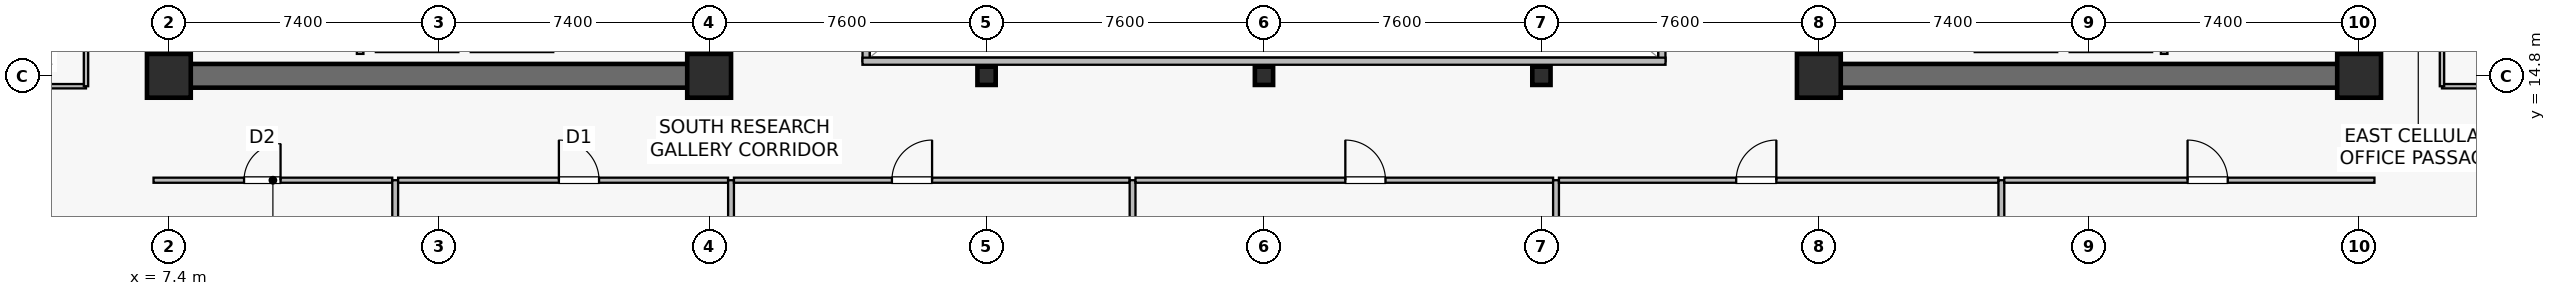
"""IFC4 building model, lengths in metres.
Left out: names, types, materials, properties, quantities, classifications, styles, units other than length and angle.
Written with IfcOpenShell. Run it as: python <this file> out.ifc"""

import sys

from ifc_helpers import new_model, si_unit, direction, frame, frame_2d, origin, origin_2d, place, context, subcontext, project, spatial, rectangle, hollow_rectangle, extrude, source, transform, mapped, element, fill, save


model = new_model("IFC4")
c1 = context("Model", 3, precision=1e-05, world=origin(), true_north=direction((0.0, 1.0)))
c2 = subcontext(c1, "Body", "Model", "MODEL_VIEW")
j1 = project(units=[si_unit("LENGTHUNIT", "METRE"), si_unit("PLANEANGLEUNIT", "RADIAN")], contexts=[c1])
p1 = place(None, origin())
s1 = spatial("IfcSite", under=j1, at=p1, CompositionType="ELEMENT")
p2 = place(p1, origin())
s2 = spatial("IfcBuilding", under=s1, at=p2, CompositionType="ELEMENT")
p3 = place(p2, frame((0.0, 0.0, 162.5)))
s3 = spatial("IfcBuildingStorey", under=s2, at=p3, CompositionType="ELEMENT", Elevation=162.5)
p4 = place(p3, frame((7.075, 14.8, 0.0), z_axis=(0.0, 0.0, 1.0), x_axis=(1.0, 0.0, 0.0)))
e1 = element("IfcWall", 1, at=p4, inside=s3, PredefinedType="SHEAR", context=c2, shape_type="SweptSolid", body=[
    extrude(rectangle(XDim=15.45, YDim=0.65, at=frame_2d((7.725, 0.0))), origin(), (0.0, 0.0, 1.0), 3.79),
])
p5 = place(p3, frame((7.4, 15.125, 0.0), z_axis=(0.0, 0.0, 1.0), x_axis=(0.0, 1.0, 0.0)))
e2 = element("IfcWall", 2, at=p5, inside=s3, PredefinedType="SHEAR", context=c2, shape_type="SweptSolid", body=[
    extrude(rectangle(XDim=18.35, YDim=0.65, at=frame_2d((9.175, 0.0))), origin(), (0.0, 0.0, 1.0), 3.79),
])
p6 = place(p3, frame((22.2, 15.125, 0.0), z_axis=(0.0, 0.0, 1.0), x_axis=(0.0, 1.0, 0.0)))
e3 = element("IfcWall", 3, at=p6, inside=s3, PredefinedType="SHEAR", context=c2, shape_type="SweptSolid", body=[
    extrude(rectangle(XDim=18.35, YDim=0.65, at=frame_2d((9.175, 0.0))), origin(), (0.0, 0.0, 1.0), 3.79),
])
p7 = place(p6, frame((3.425, 0.0, 0.0)))
e4 = element("IfcOpeningElement", 4, at=p7, cuts=e3, PredefinedType="OPENING", context=c2, shape_type="SweptSolid", body=[
    extrude(rectangle(XDim=1.42, YDim=2.2, at=frame_2d((0.71, 1.1))), frame((0.0, 0.335, 0.0), z_axis=(0.0, -1.0, 0.0), x_axis=(1.0, 0.0, 0.0)), (0.0, 0.0, 1.0), 0.67),
])
p8 = place(p3, frame((52.275, 14.8, 0.0), z_axis=(0.0, 0.0, 1.0), x_axis=(1.0, 0.0, 0.0)))
e5 = element("IfcWall", 5, at=p8, inside=s3, PredefinedType="SHEAR", context=c2, shape_type="SweptSolid", body=[
    extrude(rectangle(XDim=15.45, YDim=0.65, at=frame_2d((7.725, 0.0))), origin(), (0.0, 0.0, 1.0), 3.79),
])
p9 = place(p3, frame((52.6, 15.125, 0.0), z_axis=(0.0, 0.0, 1.0), x_axis=(0.0, 1.0, 0.0)))
e6 = element("IfcWall", 6, at=p9, inside=s3, PredefinedType="SHEAR", context=c2, shape_type="SweptSolid", body=[
    extrude(rectangle(XDim=18.35, YDim=0.65, at=frame_2d((9.175, 0.0))), origin(), (0.0, 0.0, 1.0), 3.79),
])
p10 = place(p9, frame((3.425, 0.0, 0.0)))
e7 = element("IfcOpeningElement", 7, at=p10, cuts=e6, PredefinedType="OPENING", context=c2, shape_type="SweptSolid", body=[
    extrude(rectangle(XDim=1.42, YDim=2.2, at=frame_2d((0.71, 1.1))), frame((0.0, 0.335, 0.0), z_axis=(0.0, -1.0, 0.0), x_axis=(1.0, 0.0, 0.0)), (0.0, 0.0, 1.0), 0.67),
])
p11 = place(p3, frame((67.4, 15.125, 0.0), z_axis=(0.0, 0.0, 1.0), x_axis=(0.0, 1.0, 0.0)))
e8 = element("IfcWall", 8, at=p11, inside=s3, PredefinedType="SHEAR", context=c2, shape_type="SweptSolid", body=[
    extrude(rectangle(XDim=18.35, YDim=0.65, at=frame_2d((9.175, 0.0))), origin(), (0.0, 0.0, 1.0), 3.79),
])
m1 = source(origin(), c2, "Body", "SweptSolid", [
    extrude(rectangle(XDim=1.2, YDim=1.2, at=origin_2d()), origin(), (0.0, 0.0, 1.0), 4.1),
])
for number, where, z_axis, x_axis in (
    (9, (7.4, 14.8, 0.0), (0.0, 0.0, 1.0), (1.0, 0.0, 0.0)),
    (10, (22.2, 14.8, 0.0), (0.0, 0.0, 1.0), (1.0, 0.0, 0.0)),
    (11, (52.6, 14.8, 0.0), (0.0, 0.0, 1.0), (1.0, 0.0, 0.0)),
    (12, (67.4, 14.8, 0.0), (0.0, 0.0, 1.0), (1.0, 0.0, 0.0)),
):
    element("IfcColumn", number, at=place(p3, frame(where, z_axis=z_axis, x_axis=x_axis)), inside=s3, PredefinedType="COLUMN", context=c2, shape_type="MappedRepresentation", body=[
        mapped(m1, transform((0.0, 0.0, 0.0), scale=1.0)),
    ])
m2 = source(origin(), c2, "Body", "SweptSolid", [
    extrude(hollow_rectangle(XDim=0.5, YDim=0.5, WallThickness=0.022, at=origin_2d()), origin(), (0.0, 0.0, 1.0), 4.1),
])
for number, where, z_axis, x_axis in (
    (13, (29.8, 14.8, 0.0), (0.0, 0.0, 1.0), (1.0, 0.0, 0.0)),
    (14, (37.4, 14.8, 0.0), (0.0, 0.0, 1.0), (1.0, 0.0, 0.0)),
    (15, (45.0, 14.8, 0.0), (0.0, 0.0, 1.0), (1.0, 0.0, 0.0)),
):
    element("IfcColumn", number, at=place(p3, frame(where, z_axis=z_axis, x_axis=x_axis)), inside=s3, PredefinedType="COLUMN", context=c2, shape_type="MappedRepresentation", body=[
        mapped(m2, transform((0.0, 0.0, 0.0), scale=1.0)),
    ])
p12 = place(p3, frame((13.07, 15.55, 0.0), z_axis=(0.0, 0.0, 1.0), x_axis=(1.0, 0.0, 0.0)))
e16 = element("IfcWall", 16, at=p12, inside=s3, PredefinedType="SOLIDWALL", context=c2, shape_type="SweptSolid", body=[
    extrude(rectangle(XDim=2.26, YDim=0.2, at=frame_2d((1.13, 0.0))), origin(), (0.0, 0.0, 1.0), 3.187),
])
p13 = place(p3, frame((15.67, 15.55, 0.0), z_axis=(0.0, 0.0, 1.0), x_axis=(1.0, 0.0, 0.0)))
e17 = element("IfcWall", 17, at=p13, inside=s3, PredefinedType="SOLIDWALL", context=c2, shape_type="SweptSolid", body=[
    extrude(rectangle(XDim=2.26, YDim=0.2, at=frame_2d((1.13, 0.0))), origin(), (0.0, 0.0, 1.0), 3.79),
])
p14 = place(p3, frame((12.64, 15.4, 0.0), z_axis=(0.0, 0.0, 1.0), x_axis=(0.0, 1.0, 0.0)))
e18 = element("IfcWall", 18, at=p14, inside=s3, PredefinedType="SOLIDWALL", context=c2, shape_type="SweptSolid", body=[
    extrude(rectangle(XDim=2.4, YDim=0.18, at=frame_2d((1.2, 0.0))), origin(), (0.0, 0.0, 1.0), 3.79),
])
p15 = place(p3, frame((59.47, 15.55, 0.0), z_axis=(0.0, 0.0, 1.0), x_axis=(1.0, 0.0, 0.0)))
e19 = element("IfcWall", 19, at=p15, inside=s3, PredefinedType="SOLIDWALL", context=c2, shape_type="SweptSolid", body=[
    extrude(rectangle(XDim=2.26, YDim=0.2, at=frame_2d((1.13, 0.0))), origin(), (0.0, 0.0, 1.0), 3.187),
])
p16 = place(p3, frame((56.87, 15.55, 0.0), z_axis=(0.0, 0.0, 1.0), x_axis=(1.0, 0.0, 0.0)))
e20 = element("IfcWall", 20, at=p16, inside=s3, PredefinedType="SOLIDWALL", context=c2, shape_type="SweptSolid", body=[
    extrude(rectangle(XDim=2.26, YDim=0.2, at=frame_2d((1.13, 0.0))), origin(), (0.0, 0.0, 1.0), 3.79),
])
p17 = place(p3, frame((62.06, 15.4, 0.0), z_axis=(0.0, 0.0, 1.0), x_axis=(0.0, 1.0, 0.0)))
e21 = element("IfcWall", 21, at=p17, inside=s3, PredefinedType="SOLIDWALL", context=c2, shape_type="SweptSolid", body=[
    extrude(rectangle(XDim=2.4, YDim=0.18, at=frame_2d((1.2, 0.0))), origin(), (0.0, 0.0, 1.0), 3.79),
])
p18 = place(p3, frame((26.5, 15.2, 0.0), z_axis=(0.0, 0.0, 1.0), x_axis=(0.0, 1.0, 0.0)))
e22 = element("IfcWall", 22, at=p18, inside=s3, PredefinedType="SOLIDWALL", context=c2, shape_type="SweptSolid", body=[
    extrude(rectangle(XDim=18.2, YDim=0.195, at=frame_2d((9.1, 0.0))), origin(), (0.0, 0.0, 1.0), 3.79),
])
p19 = place(p18, frame((1.8, 0.0, 0.9)))
e23 = element("IfcOpeningElement", 23, at=p19, cuts=e22, PredefinedType="OPENING", context=c2, shape_type="SweptSolid", body=[
    extrude(rectangle(XDim=1.2, YDim=1.35, at=frame_2d((0.6, 0.675))), frame((0.0, 0.107, 0.0), z_axis=(0.0, -1.0, 0.0), x_axis=(1.0, 0.0, 0.0)), (0.0, 0.0, 1.0), 0.215),
])
p20 = place(p18, frame((13.2, 0.0, 0.9)))
e24 = element("IfcOpeningElement", 24, at=p20, cuts=e22, PredefinedType="OPENING", context=c2, shape_type="SweptSolid", body=[
    extrude(rectangle(XDim=1.2, YDim=1.35, at=frame_2d((0.6, 0.675))), frame((0.0, 0.107, 0.0), z_axis=(0.0, -1.0, 0.0), x_axis=(1.0, 0.0, 0.0)), (0.0, 0.0, 1.0), 0.215),
])
p21 = place(p3, frame((48.3, 15.2, 0.0), z_axis=(0.0, 0.0, 1.0), x_axis=(0.0, 1.0, 0.0)))
e25 = element("IfcWall", 25, at=p21, inside=s3, PredefinedType="SOLIDWALL", context=c2, shape_type="SweptSolid", body=[
    extrude(rectangle(XDim=18.2, YDim=0.195, at=frame_2d((9.1, 0.0))), origin(), (0.0, 0.0, 1.0), 3.79),
])
p22 = place(p21, frame((1.8, 0.0, 0.9)))
e26 = element("IfcOpeningElement", 26, at=p22, cuts=e25, PredefinedType="OPENING", context=c2, shape_type="SweptSolid", body=[
    extrude(rectangle(XDim=1.2, YDim=1.35, at=frame_2d((0.6, 0.675))), frame((0.0, 0.107, 0.0), z_axis=(0.0, -1.0, 0.0), x_axis=(1.0, 0.0, 0.0)), (0.0, 0.0, 1.0), 0.215),
])
p23 = place(p21, frame((13.2, 0.0, 0.9)))
e27 = element("IfcOpeningElement", 27, at=p23, cuts=e25, PredefinedType="OPENING", context=c2, shape_type="SweptSolid", body=[
    extrude(rectangle(XDim=1.2, YDim=1.35, at=frame_2d((0.6, 0.675))), frame((0.0, 0.107, 0.0), z_axis=(0.0, -1.0, 0.0), x_axis=(1.0, 0.0, 0.0)), (0.0, 0.0, 1.0), 0.215),
])
p24 = place(p3, frame((26.4, 15.2, 0.0), z_axis=(0.0, 0.0, 1.0), x_axis=(1.0, 0.0, 0.0)))
e28 = element("IfcWall", 28, at=p24, inside=s3, PredefinedType="SOLIDWALL", context=c2, shape_type="SweptSolid", body=[
    extrude(rectangle(XDim=22.0, YDim=0.195, at=frame_2d((11.0, 0.0))), origin(), (0.0, 0.0, 1.0), 3.79),
])
p25 = place(p3, frame((6.98, 11.94, 0.0), z_axis=(0.0, 0.0, 1.0), x_axis=(1.0, 0.0, 0.0)))
e29 = element("IfcWall", 29, at=p25, inside=s3, PredefinedType="PARTITIONING", context=c2, shape_type="SweptSolid", body=[
    extrude(rectangle(XDim=6.54, YDim=0.14, at=frame_2d((3.27, 0.0))), origin(), (0.0, 0.0, 1.0), 3.275),
])
p26 = place(p25, frame((2.479, 0.0, 0.0)))
e30 = element("IfcOpeningElement", 30, at=p26, cuts=e29, PredefinedType="OPENING", context=c2, shape_type="SweptSolid", body=[
    extrude(rectangle(XDim=1.0, YDim=2.15, at=frame_2d((0.5, 1.075))), frame((0.0, 0.08, 0.0), z_axis=(0.0, -1.0, 0.0), x_axis=(1.0, 0.0, 0.0)), (0.0, 0.0, 1.0), 0.16),
])
p27 = place(p3, frame((13.6, 1.41, 0.0), z_axis=(0.0, 0.0, 1.0), x_axis=(0.0, 1.0, 0.0)))
e31 = element("IfcWall", 31, at=p27, inside=s3, PredefinedType="PARTITIONING", context=c2, shape_type="SweptSolid", body=[
    extrude(rectangle(XDim=10.53, YDim=0.16, at=frame_2d((5.265, 0.0))), origin(), (0.0, 0.0, 1.0), 3.075),
])
p28 = place(p3, frame((13.68, 11.94, 0.0), z_axis=(0.0, 0.0, 1.0), x_axis=(1.0, 0.0, 0.0)))
e32 = element("IfcWall", 32, at=p28, inside=s3, PredefinedType="PARTITIONING", context=c2, shape_type="SweptSolid", body=[
    extrude(rectangle(XDim=9.04, YDim=0.14, at=frame_2d((4.52, 0.0))), origin(), (0.0, 0.0, 1.0), 3.187),
])
p29 = place(p28, frame((4.404, 0.0, 0.0)))
e33 = element("IfcOpeningElement", 33, at=p29, cuts=e32, PredefinedType="OPENING", context=c2, shape_type="SweptSolid", body=[
    extrude(rectangle(XDim=1.1, YDim=2.18, at=frame_2d((0.55, 1.09))), frame((0.0, 0.08, 0.0), z_axis=(0.0, -1.0, 0.0), x_axis=(1.0, 0.0, 0.0)), (0.0, 0.0, 1.0), 0.16),
])
p30 = place(p3, frame((22.8, 1.41, 0.0), z_axis=(0.0, 0.0, 1.0), x_axis=(0.0, 1.0, 0.0)))
e34 = element("IfcWall", 34, at=p30, inside=s3, PredefinedType="PARTITIONING", context=c2, shape_type="SweptSolid", body=[
    extrude(rectangle(XDim=10.53, YDim=0.16, at=frame_2d((5.265, 0.0))), origin(), (0.0, 0.0, 1.0), 3.075),
])
p31 = place(p3, frame((22.88, 11.94, 0.0), z_axis=(0.0, 0.0, 1.0), x_axis=(1.0, 0.0, 0.0)))
e35 = element("IfcWall", 35, at=p31, inside=s3, PredefinedType="PARTITIONING", context=c2, shape_type="SweptSolid", body=[
    extrude(rectangle(XDim=10.84, YDim=0.14, at=frame_2d((5.42, 0.0))), origin(), (0.0, 0.0, 1.0), 3.187),
])
p32 = place(p31, frame((4.328, 0.0, 0.0)))
e36 = element("IfcOpeningElement", 36, at=p32, cuts=e35, PredefinedType="OPENING", context=c2, shape_type="SweptSolid", body=[
    extrude(rectangle(XDim=1.1, YDim=2.18, at=frame_2d((0.55, 1.09))), frame((0.0, 0.08, 0.0), z_axis=(0.0, -1.0, 0.0), x_axis=(1.0, 0.0, 0.0)), (0.0, 0.0, 1.0), 0.16),
])
p33 = place(p3, frame((33.8, 2.61, 0.0), z_axis=(0.0, 0.0, 1.0), x_axis=(0.0, 1.0, 0.0)))
e37 = element("IfcWall", 37, at=p33, inside=s3, PredefinedType="PARTITIONING", context=c2, shape_type="SweptSolid", body=[
    extrude(rectangle(XDim=9.33, YDim=0.16, at=frame_2d((4.665, 0.0))), origin(), (0.0, 0.0, 1.0), 3.075),
])
p34 = place(p3, frame((33.88, 11.94, 0.0), z_axis=(0.0, 0.0, 1.0), x_axis=(1.0, 0.0, 0.0)))
e38 = element("IfcWall", 38, at=p34, inside=s3, PredefinedType="PARTITIONING", context=c2, shape_type="SweptSolid", body=[
    extrude(rectangle(XDim=11.44, YDim=0.14, at=frame_2d((5.72, 0.0))), origin(), (0.0, 0.0, 1.0), 3.187),
])
p35 = place(p34, frame((5.748, 0.0, 0.0)))
e39 = element("IfcOpeningElement", 39, at=p35, cuts=e38, PredefinedType="OPENING", context=c2, shape_type="SweptSolid", body=[
    extrude(rectangle(XDim=1.1, YDim=2.18, at=frame_2d((0.55, 1.09))), frame((0.0, 0.08, 0.0), z_axis=(0.0, -1.0, 0.0), x_axis=(1.0, 0.0, 0.0)), (0.0, 0.0, 1.0), 0.16),
])
p36 = place(p3, frame((45.4, 2.61, 0.0), z_axis=(0.0, 0.0, 1.0), x_axis=(0.0, 1.0, 0.0)))
e40 = element("IfcWall", 40, at=p36, inside=s3, PredefinedType="PARTITIONING", context=c2, shape_type="SweptSolid", body=[
    extrude(rectangle(XDim=9.33, YDim=0.16, at=frame_2d((4.665, 0.0))), origin(), (0.0, 0.0, 1.0), 3.075),
])
p37 = place(p3, frame((45.48, 11.94, 0.0), z_axis=(0.0, 0.0, 1.0), x_axis=(1.0, 0.0, 0.0)))
e41 = element("IfcWall", 41, at=p37, inside=s3, PredefinedType="PARTITIONING", context=c2, shape_type="SweptSolid", body=[
    extrude(rectangle(XDim=12.04, YDim=0.14, at=frame_2d((6.02, 0.0))), origin(), (0.0, 0.0, 1.0), 3.187),
])
p38 = place(p37, frame((4.856, 0.0, 0.0)))
e42 = element("IfcOpeningElement", 42, at=p38, cuts=e41, PredefinedType="OPENING", context=c2, shape_type="SweptSolid", body=[
    extrude(rectangle(XDim=1.1, YDim=2.18, at=frame_2d((0.55, 1.09))), frame((0.0, 0.08, 0.0), z_axis=(0.0, -1.0, 0.0), x_axis=(1.0, 0.0, 0.0)), (0.0, 0.0, 1.0), 0.16),
])
p39 = place(p3, frame((57.6, 1.41, 0.0), z_axis=(0.0, 0.0, 1.0), x_axis=(0.0, 1.0, 0.0)))
e43 = element("IfcWall", 43, at=p39, inside=s3, PredefinedType="PARTITIONING", context=c2, shape_type="SweptSolid", body=[
    extrude(rectangle(XDim=10.53, YDim=0.16, at=frame_2d((5.265, 0.0))), origin(), (0.0, 0.0, 1.0), 3.075),
])
p40 = place(p3, frame((57.68, 11.94, 0.0), z_axis=(0.0, 0.0, 1.0), x_axis=(1.0, 0.0, 0.0)))
e44 = element("IfcWall", 44, at=p40, inside=s3, PredefinedType="PARTITIONING", context=c2, shape_type="SweptSolid", body=[
    extrude(rectangle(XDim=10.14, YDim=0.14, at=frame_2d((5.07, 0.0))), origin(), (0.0, 0.0, 1.0), 3.187),
])
p41 = place(p40, frame((5.021, 0.0, 0.0)))
e45 = element("IfcOpeningElement", 45, at=p41, cuts=e44, PredefinedType="OPENING", context=c2, shape_type="SweptSolid", body=[
    extrude(rectangle(XDim=1.1, YDim=2.18, at=frame_2d((0.55, 1.09))), frame((0.0, 0.08, 0.0), z_axis=(0.0, -1.0, 0.0), x_axis=(1.0, 0.0, 0.0)), (0.0, 0.0, 1.0), 0.16),
])
p42 = place(p3, frame((2.11, 14.515, 0.0), z_axis=(0.0, 0.0, 1.0), x_axis=(1.0, 0.0, 0.0)))
e46 = element("IfcWall", 46, at=p42, inside=s3, PredefinedType="PARTITIONING", context=c2, shape_type="SweptSolid", body=[
    extrude(rectangle(XDim=3.02, YDim=0.12, at=frame_2d((1.51, 0.0))), origin(), (0.0, 0.0, 1.0), 3.79),
])
p43 = place(p3, frame((5.13, 14.515, 0.0), z_axis=(0.0, 0.0, 1.0), x_axis=(0.0, 1.0, 0.0)))
e47 = element("IfcWall", 47, at=p43, inside=s3, PredefinedType="PARTITIONING", context=c2, shape_type="SweptSolid", body=[
    extrude(rectangle(XDim=7.025, YDim=0.12, at=frame_2d((3.513, 0.0))), origin(), (0.0, 0.0, 1.0), 3.79),
])
p44 = place(p43, frame((3.062, 0.0, 0.0)))
e48 = element("IfcOpeningElement", 48, at=p44, cuts=e47, PredefinedType="OPENING", context=c2, shape_type="SweptSolid", body=[
    extrude(rectangle(XDim=0.9, YDim=2.1, at=frame_2d((0.45, 1.05))), frame((0.0, 0.07, 0.0), z_axis=(0.0, -1.0, 0.0), x_axis=(1.0, 0.0, 0.0)), (0.0, 0.0, 1.0), 0.14),
])
p45 = place(p3, frame((69.67, 14.515, 0.0), z_axis=(0.0, 0.0, 1.0), x_axis=(1.0, 0.0, 0.0)))
e49 = element("IfcWall", 49, at=p45, inside=s3, PredefinedType="PARTITIONING", context=c2, shape_type="SweptSolid", body=[
    extrude(rectangle(XDim=3.02, YDim=0.12, at=frame_2d((1.51, 0.0))), origin(), (0.0, 0.0, 1.0), 3.79),
])
p46 = place(p3, frame((69.67, 14.515, 0.0), z_axis=(0.0, 0.0, 1.0), x_axis=(0.0, 1.0, 0.0)))
e50 = element("IfcWall", 50, at=p46, inside=s3, PredefinedType="PARTITIONING", context=c2, shape_type="SweptSolid", body=[
    extrude(rectangle(XDim=9.825, YDim=0.12, at=frame_2d((4.913, 0.0))), origin(), (0.0, 0.0, 1.0), 3.79),
])
p47 = place(p46, frame((4.462, 0.0, 0.0)))
e51 = element("IfcOpeningElement", 51, at=p47, cuts=e50, PredefinedType="OPENING", context=c2, shape_type="SweptSolid", body=[
    extrude(rectangle(XDim=0.9, YDim=2.1, at=frame_2d((0.45, 1.05))), frame((0.0, 0.07, 0.0), z_axis=(0.0, -1.0, 0.0), x_axis=(1.0, 0.0, 0.0)), (0.0, 0.0, 1.0), 0.14),
])
m3 = source(origin(), c2, "Body", "SweptSolid", [
    extrude(rectangle(XDim=1.0, YDim=2.15, at=frame_2d((0.5, 1.075))), frame((0.0, 0.025, 0.0), z_axis=(0.0, -1.0, 0.0), x_axis=(1.0, 0.0, 0.0)), (0.0, 0.0, 1.0), 0.05),
])
p48 = place(p26, origin())
e52 = element("IfcDoor", 52, at=p48, inside=s3, OperationType="SINGLE_SWING_RIGHT", PredefinedType="DOOR", context=c2, shape_type="MappedRepresentation", body=[
    mapped(m3, transform((0.0, 0.0, 0.0), scale=1.0)),
])
fill(e30, e52)
m4 = source(origin(), c2, "Body", "SweptSolid", [
    extrude(rectangle(XDim=1.1, YDim=2.18, at=frame_2d((0.55, 1.09))), frame((0.0, 0.025, 0.0), z_axis=(0.0, -1.0, 0.0), x_axis=(1.0, 0.0, 0.0)), (0.0, 0.0, 1.0), 0.05),
])
p49 = place(p29, origin())
e53 = element("IfcDoor", 53, at=p49, inside=s3, OperationType="SINGLE_SWING_LEFT", PredefinedType="DOOR", context=c2, shape_type="MappedRepresentation", body=[
    mapped(m4, transform((0.0, 0.0, 0.0), scale=1.0)),
])
fill(e33, e53)
p50 = place(p32, origin())
e54 = element("IfcDoor", 54, at=p50, inside=s3, OperationType="SINGLE_SWING_RIGHT", PredefinedType="DOOR", context=c2, shape_type="MappedRepresentation", body=[
    mapped(m4, transform((0.0, 0.0, 0.0), scale=1.0)),
])
fill(e36, e54)
p51 = place(p35, origin())
e55 = element("IfcDoor", 55, at=p51, inside=s3, OperationType="SINGLE_SWING_LEFT", PredefinedType="DOOR", context=c2, shape_type="MappedRepresentation", body=[
    mapped(m4, transform((0.0, 0.0, 0.0), scale=1.0)),
])
fill(e39, e55)
p52 = place(p38, origin())
e56 = element("IfcDoor", 56, at=p52, inside=s3, OperationType="SINGLE_SWING_RIGHT", PredefinedType="DOOR", context=c2, shape_type="MappedRepresentation", body=[
    mapped(m4, transform((0.0, 0.0, 0.0), scale=1.0)),
])
fill(e42, e56)
p53 = place(p41, origin())
e57 = element("IfcDoor", 57, at=p53, inside=s3, OperationType="SINGLE_SWING_LEFT", PredefinedType="DOOR", context=c2, shape_type="MappedRepresentation", body=[
    mapped(m4, transform((0.0, 0.0, 0.0), scale=1.0)),
])
fill(e45, e57)
save(model, sys.argv[1])
